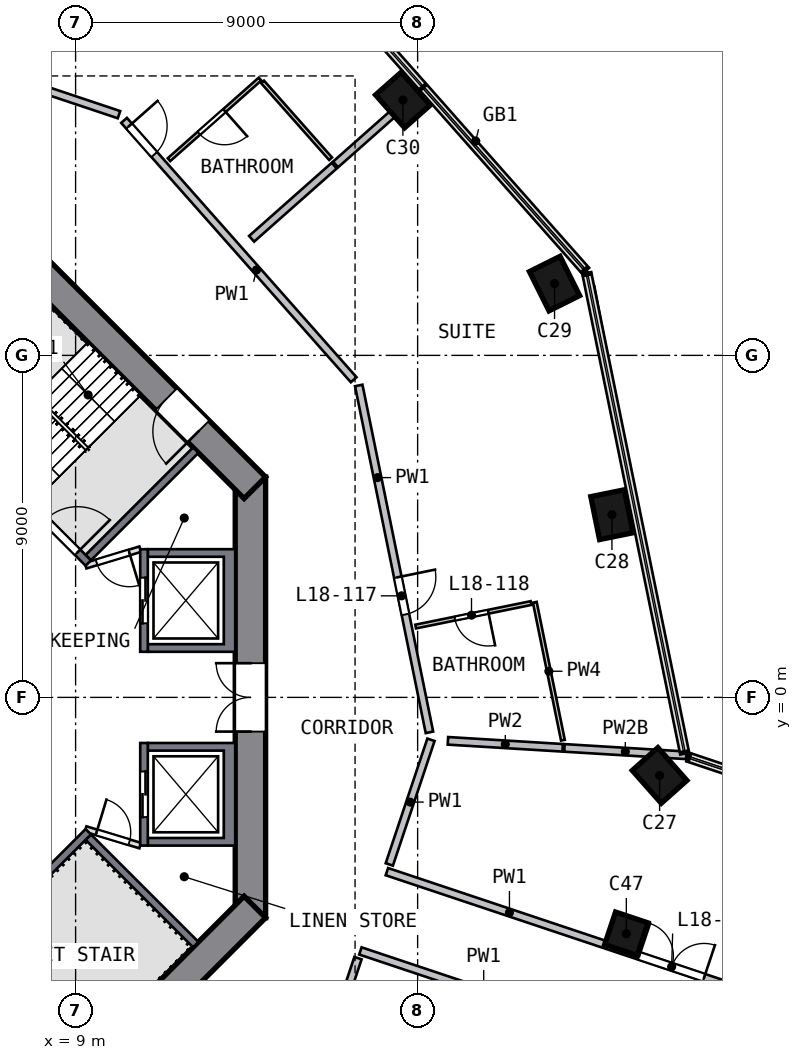
"""IFC4 building model, lengths in metres.
Left out: names, types, materials, properties, quantities, classifications, styles, units other than length and angle.
Written with IfcOpenShell. Run it as: python <this file> out.ifc"""

import sys

from ifc_helpers import new_model, si_unit, direction, frame, frame_2d, origin, origin_2d, place, context, subcontext, project, spatial, polyline, rectangle, outline, extrude, element, fill, save


model = new_model("IFC4")
c1 = context("Model", 3, precision=1e-05, world=origin(), true_north=direction((0.0, 1.0)))
c2 = subcontext(c1, "Body", "Model", "MODEL_VIEW")
j1 = project(units=[si_unit("LENGTHUNIT", "METRE"), si_unit("PLANEANGLEUNIT", "RADIAN")], contexts=[c1])
p1 = place(None, origin())
s1 = spatial("IfcSite", under=j1, at=p1, CompositionType="ELEMENT")
p2 = place(p1, origin())
s2 = spatial("IfcBuilding", under=s1, at=p2, CompositionType="ELEMENT")
p3 = place(p2, frame((0.0, 0.0, 81.0)))
s3 = spatial("IfcBuildingStorey", under=s2, at=p3, CompositionType="ELEMENT", Elevation=81.0)
p4 = place(p3, frame((24.359, -2.152, 0.0), z_axis=(0.006485295, 0.081403423, 0.996660135), x_axis=(0.664496706, -0.745149439, 0.056537084)))
e1 = element("IfcColumn", 1, at=p4, inside=s3, PredefinedType="COLUMN", context=c2, shape_type="SweptSolid", body=[
    extrude(rectangle(XDim=1.15, YDim=0.9, at=origin_2d()), origin(), (0.0, 0.0, 1.0), 4.706),
])
p5 = place(p3, frame((23.133, 4.715, 0.0), z_axis=(-0.016398563, 0.077114764, 0.996887356), x_axis=(-0.19912584, 0.976797696, -0.078836291)))
e2 = element("IfcColumn", 2, at=p5, inside=s3, PredefinedType="COLUMN", context=c2, shape_type="SweptSolid", body=[
    extrude(rectangle(XDim=1.15, YDim=0.9, at=origin_2d()), origin(), (0.0, 0.0, 1.0), 4.705),
])
p6 = place(p3, frame((21.647, 10.802, 0.0), z_axis=(-0.036683346, 0.072017658, 0.996728543), x_axis=(0.444887118, -0.891932566, 0.08081924)))
e3 = element("IfcColumn", 3, at=p6, inside=s3, PredefinedType="COLUMN", context=c2, shape_type="SweptSolid", body=[
    extrude(rectangle(XDim=1.15, YDim=0.9, at=origin_2d()), origin(), (0.0, 0.0, 1.0), 4.705),
])
p7 = place(p3, frame((17.676, 15.649, 0.0), z_axis=(-0.052724417, 0.058640346, 0.996885874), x_axis=(-0.660246291, 0.746898066, -0.078855026)))
e4 = element("IfcColumn", 4, at=p7, inside=s3, PredefinedType="COLUMN", context=c2, shape_type="SweptSolid", body=[
    extrude(rectangle(XDim=1.15, YDim=0.9, at=origin_2d()), origin(), (0.0, 0.0, 1.0), 4.705),
])
p8 = place(p3, frame((23.467, -6.314, 0.0), z_axis=(0.020442474, 0.07855306, 0.996700317), x_axis=(0.948519045, -0.316672278, 0.005503661)))
e5 = element("IfcColumn", 5, at=p8, inside=s3, PredefinedType="COLUMN", context=c2, shape_type="SweptSolid", body=[
    extrude(rectangle(XDim=0.9, YDim=0.9, at=origin_2d()), origin(), (0.0, 0.0, 1.0), 4.706),
])
p9 = place(p3, frame((13.6, -5.799, 0.0), z_axis=(0.0, 0.0, 1.0), x_axis=(0.0, 1.0, 0.0)))
e6 = element("IfcWall", 6, at=p9, inside=s3, PredefinedType="SHEAR", context=c2, shape_type="SweptSolid", body=[
    extrude(rectangle(XDim=11.598, YDim=0.8, at=frame_2d((5.799, 0.0))), origin(), (0.0, 0.0, 1.0), 5.0),
])
p10 = place(p9, frame((4.899, 0.0, 0.0)))
e7 = element("IfcOpeningElement", 7, at=p10, cuts=e6, PredefinedType="OPENING", context=c2, shape_type="SweptSolid", body=[
    extrude(rectangle(XDim=1.8, YDim=2.1, at=frame_2d((0.9, 1.05))), frame((0.0, 0.41, 0.0), z_axis=(0.0, -1.0, 0.0), x_axis=(1.0, 0.0, 0.0)), (0.0, 0.0, 1.0), 0.82),
])
p11 = place(p3, frame((13.717, 5.516, 0.0), z_axis=(0.0, 0.0, 1.0), x_axis=(-0.707106781, 0.707106781, 0.0)))
e8 = element("IfcWall", 8, at=p11, inside=s3, PredefinedType="SHEAR", context=c2, shape_type="SweptSolid", body=[
    extrude(rectangle(XDim=11.598, YDim=0.8, at=frame_2d((5.799, 0.0))), origin(), (0.0, 0.0, 1.0), 5.0),
])
p12 = place(p11, frame((2.099, 0.0, 0.0)))
e9 = element("IfcOpeningElement", 9, at=p12, cuts=e8, PredefinedType="OPENING", context=c2, shape_type="SweptSolid", body=[
    extrude(rectangle(XDim=1.2, YDim=2.1, at=frame_2d((0.6, 1.05))), frame((0.0, 0.41, 0.0), z_axis=(0.0, -1.0, 0.0), x_axis=(1.0, 0.0, 0.0)), (0.0, 0.0, 1.0), 0.82),
])
p13 = place(p3, frame((5.516, -13.717, 0.0), z_axis=(0.0, 0.0, 1.0), x_axis=(0.707106781, 0.707106781, 0.0)))
e10 = element("IfcWall", 10, at=p13, inside=s3, PredefinedType="SHEAR", context=c2, shape_type="SweptSolid", body=[
    extrude(rectangle(XDim=11.598, YDim=0.8, at=frame_2d((5.799, 0.0))), origin(), (0.0, 0.0, 1.0), 5.0),
])
p14 = place(p13, frame((2.099, 0.0, 0.0)))
e11 = element("IfcOpeningElement", 11, at=p14, cuts=e10, PredefinedType="OPENING", context=c2, shape_type="SweptSolid", body=[
    extrude(rectangle(XDim=1.2, YDim=2.1, at=frame_2d((0.6, 1.05))), frame((0.0, 0.41, 0.0), z_axis=(0.0, -1.0, 0.0), x_axis=(1.0, 0.0, 0.0)), (0.0, 0.0, 1.0), 0.82),
])
p15 = place(p3, origin())
e12 = element("IfcWall", 12, at=p15, inside=s3, PredefinedType="SOLIDWALL", context=c2, shape_type="SweptSolid", body=[
    extrude(outline(polyline([(13.2, -3.9), (10.9, -3.9), (10.9, -3.7), (12.9, -3.7), (12.9, -1.4), (10.9, -1.4), (10.9, -1.2), (13.2, -1.2), (13.2, -3.9)])), origin(), (0.0, 0.0, 1.0), 4.69),
])
p16 = place(p3, frame((10.8, -1.2, 0.0), z_axis=(0.0, 0.0, 1.0), x_axis=(0.0, -1.0, 0.0)))
e13 = element("IfcWall", 13, at=p16, inside=s3, PredefinedType="SOLIDWALL", context=c2, shape_type="SweptSolid", body=[
    extrude(rectangle(XDim=2.7, YDim=0.2, at=frame_2d((1.35, 0.0))), origin(), (0.0, 0.0, 1.0), 4.69),
])
p17 = place(p16, frame((0.75, 0.0, 0.0)))
e14 = element("IfcOpeningElement", 14, at=p17, cuts=e13, PredefinedType="OPENING", context=c2, shape_type="SweptSolid", body=[
    extrude(rectangle(XDim=1.2, YDim=2.1, at=frame_2d((0.6, 1.05))), frame((0.0, 0.11, 0.0), z_axis=(0.0, -1.0, 0.0), x_axis=(1.0, 0.0, 0.0)), (0.0, 0.0, 1.0), 0.22),
])
p18 = place(p3, origin())
e15 = element("IfcWall", 15, at=p18, inside=s3, PredefinedType="SOLIDWALL", context=c2, shape_type="SweptSolid", body=[
    extrude(outline(polyline([(13.2, 3.9), (13.2, 1.2), (10.9, 1.2), (10.9, 1.4), (12.9, 1.4), (12.9, 3.7), (10.9, 3.7), (10.9, 3.9), (13.2, 3.9)])), origin(), (0.0, 0.0, 1.0), 4.69),
])
p19 = place(p3, frame((10.8, 1.2, 0.0), z_axis=(0.0, 0.0, 1.0), x_axis=(0.0, 1.0, 0.0)))
e16 = element("IfcWall", 16, at=p19, inside=s3, PredefinedType="SOLIDWALL", context=c2, shape_type="SweptSolid", body=[
    extrude(rectangle(XDim=2.7, YDim=0.2, at=frame_2d((1.35, 0.0))), origin(), (0.0, 0.0, 1.0), 4.69),
])
p20 = place(p19, frame((0.75, 0.0, 0.0)))
e17 = element("IfcOpeningElement", 17, at=p20, cuts=e16, PredefinedType="OPENING", context=c2, shape_type="SweptSolid", body=[
    extrude(rectangle(XDim=1.2, YDim=2.1, at=frame_2d((0.6, 1.05))), frame((0.0, 0.11, 0.0), z_axis=(0.0, -1.0, 0.0), x_axis=(1.0, 0.0, 0.0)), (0.0, 0.0, 1.0), 0.22),
])
p21 = place(p3, frame((3.535, 9.334, 0.0), z_axis=(0.0, 0.0, 1.0), x_axis=(0.707106781, -0.707106781, 0.0)))
e18 = element("IfcWall", 18, at=p21, inside=s3, PredefinedType="SOLIDWALL", context=c2, shape_type="SweptSolid", body=[
    extrude(rectangle(XDim=8.2, YDim=0.2, at=frame_2d((4.1, 0.0))), origin(), (0.0, 0.0, 1.0), 4.69),
])
p22 = place(p21, frame((6.6, 0.0, 0.0)))
e19 = element("IfcOpeningElement", 19, at=p22, cuts=e18, PredefinedType="OPENING", context=c2, shape_type="SweptSolid", body=[
    extrude(rectangle(XDim=1.2, YDim=2.1, at=frame_2d((0.6, 1.05))), frame((0.0, 0.11, 0.0), z_axis=(0.0, -1.0, 0.0), x_axis=(1.0, 0.0, 0.0)), (0.0, 0.0, 1.0), 0.22),
])
p23 = place(p3, frame((9.334, 3.677, 0.0), z_axis=(0.0, 0.0, 1.0), x_axis=(0.707106781, 0.707106781, 0.0)))
e20 = element("IfcWall", 20, at=p23, inside=s3, PredefinedType="SOLIDWALL", context=c2, shape_type="SweptSolid", body=[
    extrude(rectangle(XDim=4.0, YDim=0.2, at=frame_2d((2.0, 0.0))), origin(), (0.0, 0.0, 1.0), 4.69),
])
p24 = place(p3, frame((9.334, -3.535, 0.0), z_axis=(0.0, 0.0, 1.0), x_axis=(-0.707106781, -0.707106781, 0.0)))
e21 = element("IfcWall", 21, at=p24, inside=s3, PredefinedType="SOLIDWALL", context=c2, shape_type="SweptSolid", body=[
    extrude(rectangle(XDim=8.2, YDim=0.2, at=frame_2d((4.1, 0.0))), origin(), (0.0, 0.0, 1.0), 4.69),
])
p25 = place(p24, frame((6.6, 0.0, 0.0)))
e22 = element("IfcOpeningElement", 22, at=p25, cuts=e21, PredefinedType="OPENING", context=c2, shape_type="SweptSolid", body=[
    extrude(rectangle(XDim=1.2, YDim=2.1, at=frame_2d((0.6, 1.05))), frame((0.0, 0.11, 0.0), z_axis=(0.0, -1.0, 0.0), x_axis=(1.0, 0.0, 0.0)), (0.0, 0.0, 1.0), 0.22),
])
p26 = place(p3, frame((9.334, -3.677, 0.0), z_axis=(0.0, 0.0, 1.0), x_axis=(0.707106781, -0.707106781, 0.0)))
e23 = element("IfcWall", 23, at=p26, inside=s3, PredefinedType="SOLIDWALL", context=c2, shape_type="SweptSolid", body=[
    extrude(rectangle(XDim=4.0, YDim=0.2, at=frame_2d((2.0, 0.0))), origin(), (0.0, 0.0, 1.0), 4.69),
])
p27 = place(p3, frame((10.7, 3.9, 0.0), z_axis=(0.0, 0.0, 1.0), x_axis=(-0.957084567, -0.289808785, 0.0)))
e24 = element("IfcWall", 24, at=p27, inside=s3, PredefinedType="PARTITIONING", context=c2, shape_type="SweptSolid", body=[
    extrude(rectangle(XDim=1.501, YDim=0.15, at=frame_2d((0.75, 0.0))), origin(), (0.0, 0.0, 1.0), 4.69),
])
p28 = place(p27, frame((0.301, 0.0, 0.0)))
e25 = element("IfcOpeningElement", 25, at=p28, cuts=e24, PredefinedType="OPENING", context=c2, shape_type="SweptSolid", body=[
    extrude(rectangle(XDim=0.9, YDim=2.1, at=frame_2d((0.45, 1.05))), frame((0.0, 0.085, 0.0), z_axis=(0.0, -1.0, 0.0), x_axis=(1.0, 0.0, 0.0)), (0.0, 0.0, 1.0), 0.17),
])
p29 = place(p3, frame((9.263, -3.465, 0.0), z_axis=(0.0, 0.0, 1.0), x_axis=(0.957084567, -0.289808785, 0.0)))
e26 = element("IfcWall", 26, at=p29, inside=s3, PredefinedType="PARTITIONING", context=c2, shape_type="SweptSolid", body=[
    extrude(rectangle(XDim=1.501, YDim=0.15, at=frame_2d((0.75, 0.0))), origin(), (0.0, 0.0, 1.0), 4.69),
])
p30 = place(p29, frame((0.301, 0.0, 0.0)))
e27 = element("IfcOpeningElement", 27, at=p30, cuts=e26, PredefinedType="OPENING", context=c2, shape_type="SweptSolid", body=[
    extrude(rectangle(XDim=0.9, YDim=2.1, at=frame_2d((0.45, 1.05))), frame((0.0, 0.085, 0.0), z_axis=(0.0, -1.0, 0.0), x_axis=(1.0, 0.0, 0.0)), (0.0, 0.0, 1.0), 0.17),
])
p31 = place(p3, frame((1.306, 18.288, 0.0), z_axis=(0.0, 0.0, 1.0), x_axis=(0.948428791, -0.316990264, 0.0)))
e28 = element("IfcWall", 28, at=p31, inside=s3, PredefinedType="SOLIDWALL", context=c2, shape_type="SweptSolid", body=[
    extrude(rectangle(XDim=9.316, YDim=0.2, at=frame_2d((4.658, 0.0))), origin(), (0.0, 0.0, 1.0), 4.69),
])
p32 = place(p31, frame((2.508, 0.0, 0.0)))
e29 = element("IfcOpeningElement", 29, at=p32, cuts=e28, PredefinedType="OPENING", context=c2, shape_type="SweptSolid", body=[
    extrude(rectangle(XDim=0.9, YDim=2.1, at=frame_2d((0.45, 1.05))), frame((0.0, 0.11, 0.0), z_axis=(0.0, -1.0, 0.0), x_axis=(1.0, 0.0, 0.0)), (0.0, 0.0, 1.0), 0.22),
])
p33 = place(p31, frame((0.2, 0.0, 0.0)))
e30 = element("IfcOpeningElement", 30, at=p33, cuts=e28, PredefinedType="OPENING", context=c2, shape_type="SweptSolid", body=[
    extrude(rectangle(XDim=0.9, YDim=2.1, at=frame_2d((0.45, 1.05))), frame((0.0, 0.11, 0.0), z_axis=(0.0, -1.0, 0.0), x_axis=(1.0, 0.0, 0.0)), (0.0, 0.0, 1.0), 0.22),
])
p34 = place(p3, frame((10.275, 15.184, 0.0), z_axis=(0.0, 0.0, 1.0), x_axis=(0.662882999, -0.748722999, 0.0)))
e31 = element("IfcWall", 31, at=p34, inside=s3, PredefinedType="SOLIDWALL", context=c2, shape_type="SweptSolid", body=[
    extrude(rectangle(XDim=9.115, YDim=0.2, at=frame_2d((4.558, 0.0))), origin(), (0.0, 0.0, 1.0), 4.69),
])
p35 = place(p34, frame((0.2, 0.0, 0.0)))
e32 = element("IfcOpeningElement", 32, at=p35, cuts=e31, PredefinedType="OPENING", context=c2, shape_type="SweptSolid", body=[
    extrude(rectangle(XDim=1.0, YDim=2.1, at=frame_2d((0.5, 1.05))), frame((0.0, 0.11, 0.0), z_axis=(0.0, -1.0, 0.0), x_axis=(1.0, 0.0, 0.0)), (0.0, 0.0, 1.0), 0.22),
])
p36 = place(p3, frame((15.398, -9.952, 0.0), z_axis=(0.0, 0.0, 1.0), x_axis=(0.316946987, 0.948443255, 0.0)))
e33 = element("IfcWall", 33, at=p36, inside=s3, PredefinedType="SOLIDWALL", context=c2, shape_type="SweptSolid", body=[
    extrude(rectangle(XDim=3.258, YDim=0.2, at=frame_2d((1.629, 0.0))), origin(), (0.0, 0.0, 1.0), 4.69),
])
p37 = place(p3, frame((16.45, 8.208, 0.0), z_axis=(0.0, 0.0, 1.0), x_axis=(0.199693015, -0.97985851, 0.0)))
e34 = element("IfcWall", 34, at=p37, inside=s3, PredefinedType="SOLIDWALL", context=c2, shape_type="SweptSolid", body=[
    extrude(rectangle(XDim=9.316, YDim=0.2, at=frame_2d((4.658, 0.0))), origin(), (0.0, 0.0, 1.0), 4.69),
])
p38 = place(p37, frame((5.15, 0.0, 0.0)))
e35 = element("IfcOpeningElement", 35, at=p38, cuts=e34, PredefinedType="OPENING", context=c2, shape_type="SweptSolid", body=[
    extrude(rectangle(XDim=1.0, YDim=2.1, at=frame_2d((0.5, 1.05))), frame((0.0, 0.11, 0.0), z_axis=(0.0, -1.0, 0.0), x_axis=(1.0, 0.0, 0.0)), (0.0, 0.0, 1.0), 0.22),
])
p39 = place(p3, frame((17.255, -4.396, 0.0), z_axis=(0.0, 0.0, 1.0), x_axis=(0.316968911, 0.948435928, 0.0)))
e36 = element("IfcWall", 36, at=p39, inside=s3, PredefinedType="SOLIDWALL", context=c2, shape_type="SweptSolid", body=[
    extrude(rectangle(XDim=3.458, YDim=0.2, at=frame_2d((1.729, 0.0))), origin(), (0.0, 0.0, 1.0), 4.69),
])
p40 = place(p3, frame((30.143, -11.234, 0.0), z_axis=(0.0, 0.0, 1.0), x_axis=(-0.94843363, 0.316975788, 0.0)))
e37 = element("IfcWall", 37, at=p40, inside=s3, PredefinedType="SOLIDWALL", context=c2, shape_type="SweptSolid", body=[
    extrude(rectangle(XDim=14.392, YDim=0.2, at=frame_2d((7.196, 0.0))), origin(), (0.0, 0.0, 1.0), 4.69),
])
p41 = place(p40, frame((5.55, 0.0, 0.0)))
e38 = element("IfcOpeningElement", 38, at=p41, cuts=e37, PredefinedType="OPENING", context=c2, shape_type="SweptSolid", body=[
    extrude(rectangle(XDim=1.8, YDim=2.1, at=frame_2d((0.9, 1.05))), frame((0.0, 0.11, 0.0), z_axis=(0.0, -1.0, 0.0), x_axis=(1.0, 0.0, 0.0)), (0.0, 0.0, 1.0), 0.22),
])
p42 = place(p3, frame((17.191, -4.586, 0.0), z_axis=(0.0, 0.0, 1.0), x_axis=(0.948435294, -0.316970808, 0.0)))
e39 = element("IfcWall", 39, at=p42, inside=s3, PredefinedType="SOLIDWALL", context=c2, shape_type="SweptSolid", body=[
    extrude(rectangle(XDim=14.389, YDim=0.2, at=frame_2d((7.195, 0.0))), origin(), (0.0, 0.0, 1.0), 4.69),
])
p43 = place(p42, frame((7.0, 0.0, 0.0)))
e40 = element("IfcOpeningElement", 40, at=p43, cuts=e39, PredefinedType="OPENING", context=c2, shape_type="SweptSolid", body=[
    extrude(rectangle(XDim=1.8, YDim=2.1, at=frame_2d((0.9, 1.05))), frame((0.0, 0.11, 0.0), z_axis=(0.0, -1.0, 0.0), x_axis=(1.0, 0.0, 0.0)), (0.0, 0.0, 1.0), 0.22),
])
p44 = place(p3, frame((13.631, 12.068, 0.0), z_axis=(0.0, 0.0, 1.0), x_axis=(0.748710935, 0.662896626, 0.0)))
e41 = element("IfcWall", 41, at=p44, inside=s3, PredefinedType="SOLIDWALL", context=c2, shape_type="SweptSolid", body=[
    extrude(rectangle(XDim=2.905, YDim=0.2, at=frame_2d((1.452, 0.0))), origin(), (0.0, 0.0, 1.0), 4.69),
])
p45 = place(p3, frame((15.84, 14.024, 0.0), z_axis=(0.0, 0.0, 1.0), x_axis=(0.74873661, 0.662867626, 0.0)))
e42 = element("IfcWall", 42, at=p45, inside=s3, PredefinedType="SOLIDWALL", context=c2, shape_type="SweptSolid", body=[
    extrude(rectangle(XDim=3.102, YDim=0.2, at=frame_2d((1.551, 0.0))), origin(), (0.0, 0.0, 1.0), 4.69),
])
p46 = place(p3, frame((18.797, -1.143, 0.0), z_axis=(0.0, 0.0, 1.0), x_axis=(0.998156069, -0.060699771, 0.0)))
e43 = element("IfcWall", 43, at=p46, inside=s3, PredefinedType="SOLIDWALL", context=c2, shape_type="SweptSolid", body=[
    extrude(rectangle(XDim=3.025, YDim=0.2, at=frame_2d((1.512, 0.0))), origin(), (0.0, 0.0, 1.0), 4.69),
])
p47 = place(p3, frame((21.862, -1.33, 0.0), z_axis=(0.0, 0.0, 1.0), x_axis=(0.998157909, -0.060669511, 0.0)))
e44 = element("IfcWall", 44, at=p47, inside=s3, PredefinedType="SOLIDWALL", context=c2, shape_type="SweptSolid", body=[
    extrude(rectangle(XDim=3.211, YDim=0.2, at=frame_2d((1.605, 0.0))), origin(), (0.0, 0.0, 1.0), 4.19),
])
p48 = place(p3, frame((13.853, 16.271, 0.0), z_axis=(0.0, 0.0, 1.0), x_axis=(-0.748721252, -0.662884973, 0.0)))
e45 = element("IfcWall", 45, at=p48, inside=s3, PredefinedType="PARTITIONING", context=c2, shape_type="SweptSolid", body=[
    extrude(rectangle(XDim=3.2, YDim=0.1, at=frame_2d((1.6, 0.0))), origin(), (0.0, 0.0, 1.0), 4.69),
])
p49 = place(p48, frame((1.25, 0.0, 0.0)))
e46 = element("IfcOpeningElement", 46, at=p49, cuts=e45, PredefinedType="OPENING", context=c2, shape_type="SweptSolid", body=[
    extrude(rectangle(XDim=0.9, YDim=2.1, at=frame_2d((0.45, 1.05))), frame((0.0, 0.06, 0.0), z_axis=(0.0, -1.0, 0.0), x_axis=(1.0, 0.0, 0.0)), (0.0, 0.0, 1.0), 0.12),
])
p50 = place(p3, frame((13.919, 16.197, 0.0), z_axis=(0.0, 0.0, 1.0), x_axis=(0.662897695, -0.748709987, 0.0)))
e47 = element("IfcWall", 47, at=p50, inside=s3, PredefinedType="PARTITIONING", context=c2, shape_type="SweptSolid", body=[
    extrude(rectangle(XDim=2.7, YDim=0.1, at=frame_2d((1.35, 0.0))), origin(), (0.0, 0.0, 1.0), 4.69),
])
p51 = place(p3, frame((20.985, 2.483, 0.0), z_axis=(0.0, 0.0, 1.0), x_axis=(-0.979853152, -0.199719305, 0.0)))
e48 = element("IfcWall", 48, at=p51, inside=s3, PredefinedType="PARTITIONING", context=c2, shape_type="SweptSolid", body=[
    extrude(rectangle(XDim=3.1, YDim=0.1, at=frame_2d((1.55, 0.0))), origin(), (0.0, 0.0, 1.0), 4.69),
])
p52 = place(p51, frame((1.15, 0.0, 0.0)))
e49 = element("IfcOpeningElement", 49, at=p52, cuts=e48, PredefinedType="OPENING", context=c2, shape_type="SweptSolid", body=[
    extrude(rectangle(XDim=0.9, YDim=2.1, at=frame_2d((0.45, 1.05))), frame((0.0, 0.06, 0.0), z_axis=(0.0, -1.0, 0.0), x_axis=(1.0, 0.0, 0.0)), (0.0, 0.0, 1.0), 0.12),
])
p53 = place(p3, frame((21.083, 2.503, 0.0), z_axis=(0.0, 0.0, 1.0), x_axis=(0.199714646, -0.979854101, 0.0)))
e50 = element("IfcWall", 50, at=p53, inside=s3, PredefinedType="PARTITIONING", context=c2, shape_type="SweptSolid", body=[
    extrude(rectangle(XDim=3.704, YDim=0.1, at=frame_2d((1.852, 0.0))), origin(), (0.0, 0.0, 1.0), 4.69),
])
p54 = place(p17, origin())
e51 = element("IfcDoor", 51, at=p54, inside=s3, OperationType="DOUBLE_DOOR_SLIDING", PredefinedType="DOOR", context=c2, shape_type="SweptSolid", body=[
    extrude(rectangle(XDim=1.2, YDim=2.1, at=frame_2d((0.6, 1.05))), frame((0.0, 0.025, 0.0), z_axis=(0.0, -1.0, 0.0), x_axis=(1.0, 0.0, 0.0)), (0.0, 0.0, 1.0), 0.05),
])
fill(e14, e51)
p55 = place(p20, origin())
e52 = element("IfcDoor", 52, at=p55, inside=s3, OperationType="DOUBLE_DOOR_SLIDING", PredefinedType="DOOR", context=c2, shape_type="SweptSolid", body=[
    extrude(rectangle(XDim=1.2, YDim=2.1, at=frame_2d((0.6, 1.05))), frame((0.0, 0.025, 0.0), z_axis=(0.0, -1.0, 0.0), x_axis=(1.0, 0.0, 0.0)), (0.0, 0.0, 1.0), 0.05),
])
fill(e17, e52)
p56 = place(p22, origin())
e53 = element("IfcDoor", 53, at=p56, inside=s3, OperationType="SINGLE_SWING_RIGHT", PredefinedType="DOOR", context=c2, shape_type="SweptSolid", body=[
    extrude(rectangle(XDim=1.2, YDim=2.1, at=frame_2d((0.6, 1.05))), frame((0.0, 0.025, 0.0), z_axis=(0.0, -1.0, 0.0), x_axis=(1.0, 0.0, 0.0)), (0.0, 0.0, 1.0), 0.05),
])
fill(e19, e53)
p57 = place(p10, origin())
e54 = element("IfcDoor", 54, at=p57, inside=s3, OperationType="DOUBLE_DOOR_SINGLE_SWING", PredefinedType="DOOR", context=c2, shape_type="SweptSolid", body=[
    extrude(rectangle(XDim=1.8, YDim=2.1, at=frame_2d((0.9, 1.05))), frame((0.0, 0.025, 0.0), z_axis=(0.0, -1.0, 0.0), x_axis=(1.0, 0.0, 0.0)), (0.0, 0.0, 1.0), 0.05),
])
fill(e7, e54)
p58 = place(p12, origin())
e55 = element("IfcDoor", 55, at=p58, inside=s3, OperationType="SINGLE_SWING_LEFT", PredefinedType="DOOR", context=c2, shape_type="SweptSolid", body=[
    extrude(rectangle(XDim=1.2, YDim=2.1, at=frame_2d((0.6, 1.05))), frame((0.0, 0.025, 0.0), z_axis=(0.0, -1.0, 0.0), x_axis=(1.0, 0.0, 0.0)), (0.0, 0.0, 1.0), 0.05),
])
fill(e9, e55)
p59 = place(p28, origin())
e56 = element("IfcDoor", 56, at=p59, inside=s3, OperationType="SINGLE_SWING_LEFT", PredefinedType="DOOR", context=c2, shape_type="SweptSolid", body=[
    extrude(rectangle(XDim=0.9, YDim=2.1, at=frame_2d((0.45, 1.05))), frame((0.0, 0.025, 0.0), z_axis=(0.0, -1.0, 0.0), x_axis=(1.0, 0.0, 0.0)), (0.0, 0.0, 1.0), 0.05),
])
fill(e25, e56)
p60 = place(p30, origin())
e57 = element("IfcDoor", 57, at=p60, inside=s3, OperationType="SINGLE_SWING_LEFT", PredefinedType="DOOR", context=c2, shape_type="SweptSolid", body=[
    extrude(rectangle(XDim=0.9, YDim=2.1, at=frame_2d((0.45, 1.05))), frame((0.0, 0.025, 0.0), z_axis=(0.0, -1.0, 0.0), x_axis=(1.0, 0.0, 0.0)), (0.0, 0.0, 1.0), 0.05),
])
fill(e27, e57)
p61 = place(p43, origin())
e58 = element("IfcDoor", 58, at=p61, inside=s3, OperationType="DOUBLE_DOOR_SINGLE_SWING", PredefinedType="DOOR", context=c2, shape_type="SweptSolid", body=[
    extrude(rectangle(XDim=1.8, YDim=2.1, at=frame_2d((0.9, 1.05))), frame((0.0, 0.025, 0.0), z_axis=(0.0, -1.0, 0.0), x_axis=(1.0, 0.0, 0.0)), (0.0, 0.0, 1.0), 0.05),
])
fill(e40, e58)
p62 = place(p38, origin())
e59 = element("IfcDoor", 59, at=p62, inside=s3, OperationType="SINGLE_SWING_LEFT", PredefinedType="DOOR", context=c2, shape_type="SweptSolid", body=[
    extrude(rectangle(XDim=1.0, YDim=2.1, at=frame_2d((0.5, 1.05))), frame((0.0, 0.025, 0.0), z_axis=(0.0, -1.0, 0.0), x_axis=(1.0, 0.0, 0.0)), (0.0, 0.0, 1.0), 0.05),
])
fill(e35, e59)
p63 = place(p52, origin())
e60 = element("IfcDoor", 60, at=p63, inside=s3, OperationType="SINGLE_SWING_LEFT", PredefinedType="DOOR", context=c2, shape_type="SweptSolid", body=[
    extrude(rectangle(XDim=0.9, YDim=2.1, at=frame_2d((0.45, 1.05))), frame((0.0, 0.025, 0.0), z_axis=(0.0, -1.0, 0.0), x_axis=(1.0, 0.0, 0.0)), (0.0, 0.0, 1.0), 0.05),
])
fill(e49, e60)
p64 = place(p35, origin())
e61 = element("IfcDoor", 61, at=p64, inside=s3, OperationType="SINGLE_SWING_LEFT", PredefinedType="DOOR", context=c2, shape_type="SweptSolid", body=[
    extrude(rectangle(XDim=1.0, YDim=2.1, at=frame_2d((0.5, 1.05))), frame((0.0, 0.025, 0.0), z_axis=(0.0, -1.0, 0.0), x_axis=(1.0, 0.0, 0.0)), (0.0, 0.0, 1.0), 0.05),
])
fill(e32, e61)
p65 = place(p49, origin())
e62 = element("IfcDoor", 62, at=p65, inside=s3, OperationType="SINGLE_SWING_LEFT", PredefinedType="DOOR", context=c2, shape_type="SweptSolid", body=[
    extrude(rectangle(XDim=0.9, YDim=2.1, at=frame_2d((0.45, 1.05))), frame((0.0, 0.025, 0.0), z_axis=(0.0, -1.0, 0.0), x_axis=(1.0, 0.0, 0.0)), (0.0, 0.0, 1.0), 0.05),
])
fill(e46, e62)
save(model, sys.argv[1])
